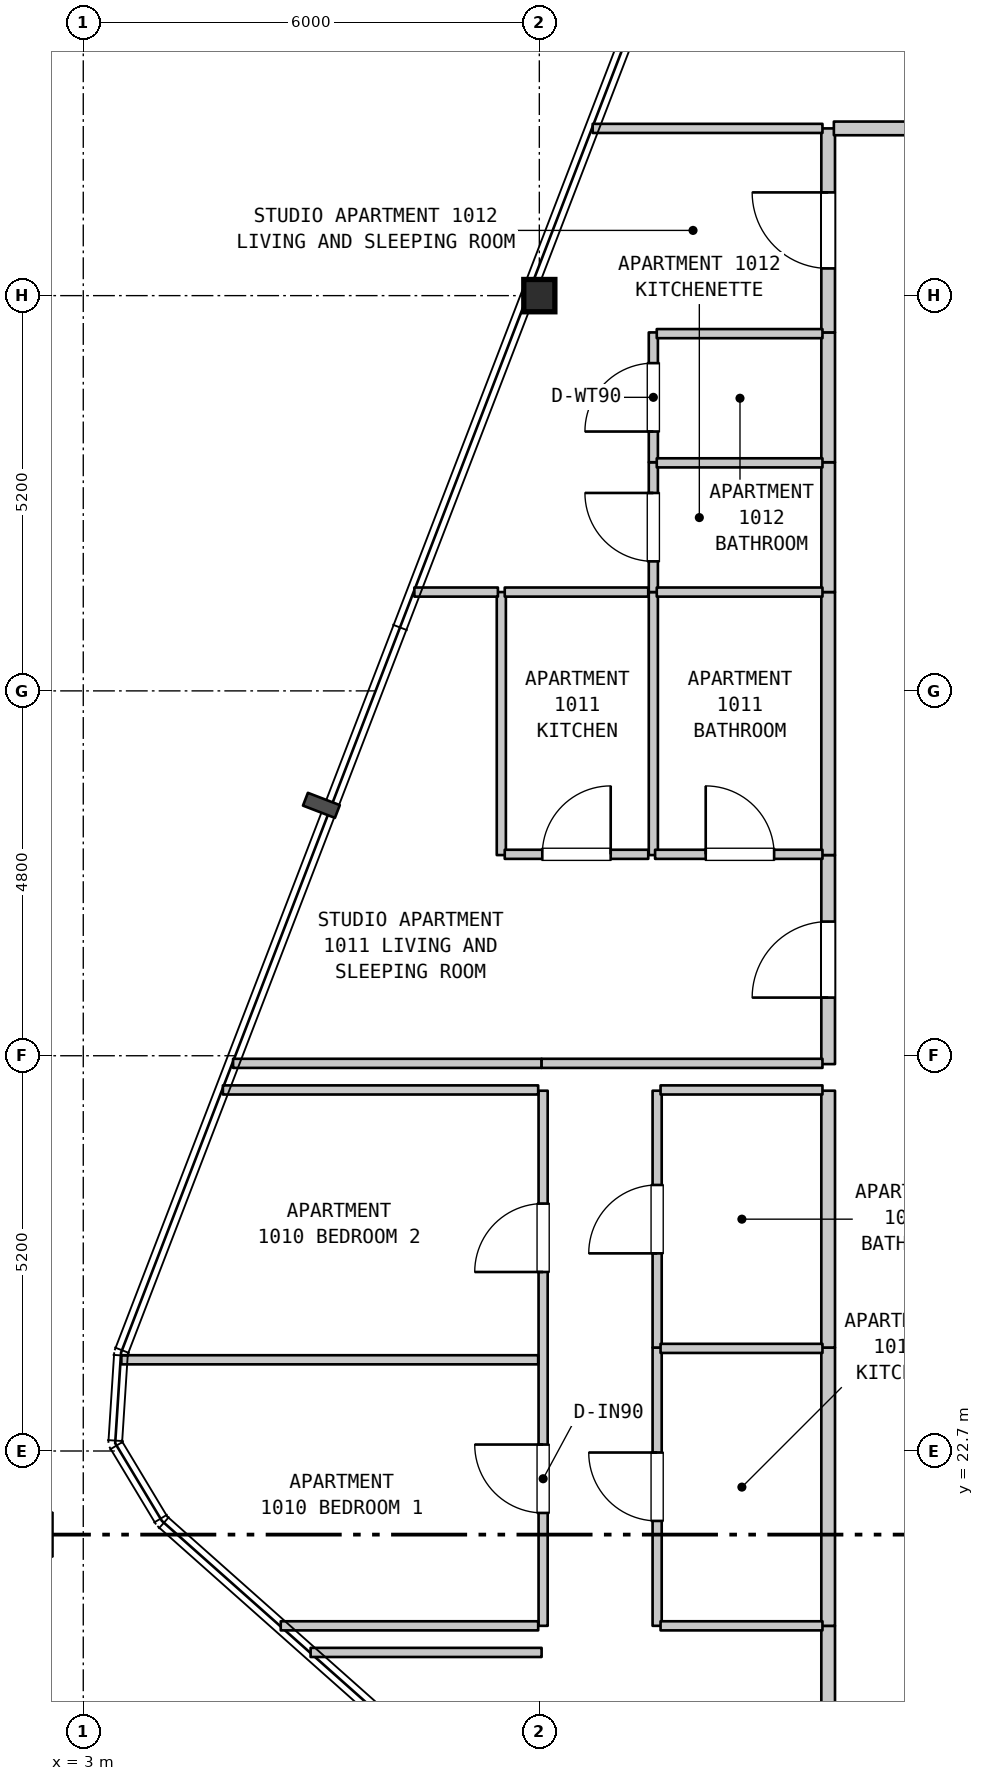
"""IFC4 building model, lengths in metres.
Left out: names, types, materials, properties, quantities, classifications, styles, units other than length and angle.
Written with IfcOpenShell. Run it as: python <this file> out.ifc"""

import sys

from ifc_helpers import new_model, si_unit, direction, frame, frame_2d, origin, origin_2d, place, context, subcontext, project, spatial, rectangle, i_section, extrude, element, fill, save


model = new_model("IFC4")
c1 = context("Model", 3, precision=1e-05, world=origin(), true_north=direction((0.0, 1.0)))
c2 = subcontext(c1, "Body", "Model", "MODEL_VIEW")
j1 = project(units=[si_unit("LENGTHUNIT", "METRE"), si_unit("PLANEANGLEUNIT", "RADIAN")], contexts=[c1])
p1 = place(None, origin())
s1 = spatial("IfcSite", under=j1, at=p1, CompositionType="ELEMENT")
p2 = place(p1, origin())
s2 = spatial("IfcBuilding", under=s1, at=p2, CompositionType="ELEMENT")
p3 = place(p2, frame((0.0, 0.0, 46.2)))
s3 = spatial("IfcBuildingStorey", under=s2, at=p3, CompositionType="ELEMENT", Elevation=46.2)
p4 = place(p3, frame((9.0, 37.9, 0.0), z_axis=(0.0, 0.0, 1.0), x_axis=(1.0, 0.0, 0.0)))
e1 = element("IfcColumn", 1, at=p4, inside=s3, PredefinedType="COLUMN", context=c2, shape_type="SweptSolid", body=[
    extrude(i_section(OverallWidth=0.409, OverallDepth=0.425, WebThickness=0.032, FlangeThickness=0.052, FilletRadius=0.015, at=origin_2d()), origin(), (0.0, 0.0, 1.0), 3.7),
])
p5 = place(p3, frame((8.5, 30.54, 0.0), z_axis=(0.0, 0.0, 1.0), x_axis=(0.0, 1.0, 0.0)))
e2 = element("IfcWall", 2, at=p5, inside=s3, PredefinedType="PARTITIONING", context=c2, shape_type="SweptSolid", body=[
    extrude(rectangle(XDim=3.46, YDim=0.12, at=frame_2d((1.73, 0.0))), origin(), (0.0, 0.0, 1.0), 3.385),
])
p6 = place(p3, frame((9.05, 20.4, 0.0), z_axis=(0.0, 0.0, 1.0), x_axis=(0.0, 1.0, 0.0)))
e3 = element("IfcWall", 3, at=p6, inside=s3, PredefinedType="PARTITIONING", context=c2, shape_type="SweptSolid", body=[
    extrude(rectangle(XDim=7.04, YDim=0.12, at=frame_2d((3.52, 0.0))), origin(), (0.0, 0.0, 1.0), 2.785),
])
p7 = place(p6, frame((1.485, 0.0, 0.0)))
e4 = element("IfcOpeningElement", 4, at=p7, cuts=e3, PredefinedType="OPENING", context=c2, shape_type="SweptSolid", body=[
    extrude(rectangle(XDim=0.9, YDim=2.15, at=frame_2d((0.45, 1.075))), frame((0.0, 0.07, 0.0), z_axis=(0.0, -1.0, 0.0), x_axis=(1.0, 0.0, 0.0)), (0.0, 0.0, 1.0), 0.14),
])
p8 = place(p6, frame((4.655, 0.0, 0.0)))
e5 = element("IfcOpeningElement", 5, at=p8, cuts=e3, PredefinedType="OPENING", context=c2, shape_type="SweptSolid", body=[
    extrude(rectangle(XDim=0.9, YDim=2.15, at=frame_2d((0.45, 1.075))), frame((0.0, 0.07, 0.0), z_axis=(0.0, -1.0, 0.0), x_axis=(1.0, 0.0, 0.0)), (0.0, 0.0, 1.0), 0.14),
])
p9 = place(p3, frame((10.5, 30.54, 0.0), z_axis=(0.0, 0.0, 1.0), x_axis=(0.0, 1.0, 0.0)))
e6 = element("IfcWall", 6, at=p9, inside=s3, PredefinedType="PARTITIONING", context=c2, shape_type="SweptSolid", body=[
    extrude(rectangle(XDim=3.46, YDim=0.12, at=frame_2d((1.73, 0.0))), origin(), (0.0, 0.0, 1.0), 3.385),
])
p10 = place(p3, frame((10.5, 34.0, 0.0), z_axis=(0.0, 0.0, 1.0), x_axis=(0.0, 1.0, 0.0)))
e7 = element("IfcWall", 7, at=p10, inside=s3, PredefinedType="PARTITIONING", context=c2, shape_type="SweptSolid", body=[
    extrude(rectangle(XDim=1.708, YDim=0.12, at=frame_2d((0.854, 0.0))), origin(), (0.0, 0.0, 1.0), 3.385),
])
p11 = place(p10, frame((0.404, 0.0, 0.0)))
e8 = element("IfcOpeningElement", 8, at=p11, cuts=e7, PredefinedType="OPENING", context=c2, shape_type="SweptSolid", body=[
    extrude(rectangle(XDim=0.9, YDim=2.15, at=frame_2d((0.45, 1.075))), frame((0.0, 0.07, 0.0), z_axis=(0.0, -1.0, 0.0), x_axis=(1.0, 0.0, 0.0)), (0.0, 0.0, 1.0), 0.14),
])
p12 = place(p3, frame((10.5, 35.708, 0.0), z_axis=(0.0, 0.0, 1.0), x_axis=(0.0, 1.0, 0.0)))
e9 = element("IfcWall", 9, at=p12, inside=s3, PredefinedType="PARTITIONING", context=c2, shape_type="SweptSolid", body=[
    extrude(rectangle(XDim=1.708, YDim=0.12, at=frame_2d((0.854, 0.0))), origin(), (0.0, 0.0, 1.0), 3.385),
])
p13 = place(p12, frame((0.404, 0.0, 0.0)))
e10 = element("IfcOpeningElement", 10, at=p13, cuts=e9, PredefinedType="OPENING", context=c2, shape_type="SweptSolid", body=[
    extrude(rectangle(XDim=0.9, YDim=2.1, at=frame_2d((0.45, 1.05))), frame((0.0, 0.07, 0.0), z_axis=(0.0, -1.0, 0.0), x_axis=(1.0, 0.0, 0.0)), (0.0, 0.0, 1.0), 0.14),
])
p14 = place(p3, frame((10.55, 20.4, 0.0), z_axis=(0.0, 0.0, 1.0), x_axis=(0.0, 1.0, 0.0)))
e11 = element("IfcWall", 11, at=p14, inside=s3, PredefinedType="PARTITIONING", context=c2, shape_type="SweptSolid", body=[
    extrude(rectangle(XDim=3.661, YDim=0.12, at=frame_2d((1.831, 0.0))), origin(), (0.0, 0.0, 1.0), 3.385),
])
p15 = place(p14, frame((1.38, 0.0, 0.0)))
e12 = element("IfcOpeningElement", 12, at=p15, cuts=e11, PredefinedType="OPENING", context=c2, shape_type="SweptSolid", body=[
    extrude(rectangle(XDim=0.9, YDim=2.15, at=frame_2d((0.45, 1.075))), frame((0.0, 0.07, 0.0), z_axis=(0.0, -1.0, 0.0), x_axis=(1.0, 0.0, 0.0)), (0.0, 0.0, 1.0), 0.14),
])
p16 = place(p3, frame((10.55, 24.061, 0.0), z_axis=(0.0, 0.0, 1.0), x_axis=(0.0, 1.0, 0.0)))
e13 = element("IfcWall", 13, at=p16, inside=s3, PredefinedType="PARTITIONING", context=c2, shape_type="SweptSolid", body=[
    extrude(rectangle(XDim=3.379, YDim=0.12, at=frame_2d((1.689, 0.0))), origin(), (0.0, 0.0, 1.0), 3.385),
])
p17 = place(p16, frame((1.239, 0.0, 0.0)))
e14 = element("IfcOpeningElement", 14, at=p17, cuts=e13, PredefinedType="OPENING", context=c2, shape_type="SweptSolid", body=[
    extrude(rectangle(XDim=0.9, YDim=2.1, at=frame_2d((0.45, 1.05))), frame((0.0, 0.07, 0.0), z_axis=(0.0, -1.0, 0.0), x_axis=(1.0, 0.0, 0.0)), (0.0, 0.0, 1.0), 0.14),
])
p18 = place(p3, frame((12.8, 17.3, 0.0), z_axis=(0.0, 0.0, 1.0), x_axis=(0.0, 1.0, 0.0)))
e15 = element("IfcWall", 15, at=p18, inside=s3, PredefinedType="STANDARD", context=c2, shape_type="SweptSolid", body=[
    extrude(rectangle(XDim=3.1, YDim=0.18, at=frame_2d((1.55, 0.0))), origin(), (0.0, 0.0, 1.0), 3.385),
])
p19 = place(p18, frame((0.978, 0.0, 0.0)))
e16 = element("IfcOpeningElement", 16, at=p19, cuts=e15, PredefinedType="OPENING", context=c2, shape_type="SweptSolid", body=[
    extrude(rectangle(XDim=1.0, YDim=2.15, at=frame_2d((0.5, 1.075))), frame((0.0, 0.1, 0.0), z_axis=(0.0, -1.0, 0.0), x_axis=(1.0, 0.0, 0.0)), (0.0, 0.0, 1.0), 0.2),
])
p20 = place(p3, frame((12.8, 20.4, 0.0), z_axis=(0.0, 0.0, 1.0), x_axis=(0.0, 1.0, 0.0)))
e17 = element("IfcWall", 17, at=p20, inside=s3, PredefinedType="STANDARD", context=c2, shape_type="SweptSolid", body=[
    extrude(rectangle(XDim=3.661, YDim=0.18, at=frame_2d((1.831, 0.0))), origin(), (0.0, 0.0, 1.0), 3.385),
])
p21 = place(p3, frame((12.8, 24.061, 0.0), z_axis=(0.0, 0.0, 1.0), x_axis=(0.0, 1.0, 0.0)))
e18 = element("IfcWall", 18, at=p21, inside=s3, PredefinedType="STANDARD", context=c2, shape_type="SweptSolid", body=[
    extrude(rectangle(XDim=3.379, YDim=0.18, at=frame_2d((1.689, 0.0))), origin(), (0.0, 0.0, 1.0), 3.385),
])
p22 = place(p3, frame((12.8, 27.79, 0.0), z_axis=(0.0, 0.0, 1.0), x_axis=(0.0, 1.0, 0.0)))
e19 = element("IfcWall", 19, at=p22, inside=s3, PredefinedType="STANDARD", context=c2, shape_type="SweptSolid", body=[
    extrude(rectangle(XDim=2.75, YDim=0.18, at=frame_2d((1.375, 0.0))), origin(), (0.0, 0.0, 1.0), 3.385),
])
p23 = place(p22, frame((0.875, 0.0, 0.0)))
e20 = element("IfcOpeningElement", 20, at=p23, cuts=e19, PredefinedType="OPENING", context=c2, shape_type="SweptSolid", body=[
    extrude(rectangle(XDim=1.0, YDim=2.15, at=frame_2d((0.5, 1.075))), frame((0.0, 0.1, 0.0), z_axis=(0.0, -1.0, 0.0), x_axis=(1.0, 0.0, 0.0)), (0.0, 0.0, 1.0), 0.2),
])
p24 = place(p3, frame((12.8, 30.54, 0.0), z_axis=(0.0, 0.0, 1.0), x_axis=(0.0, 1.0, 0.0)))
e21 = element("IfcWall", 21, at=p24, inside=s3, PredefinedType="STANDARD", context=c2, shape_type="SweptSolid", body=[
    extrude(rectangle(XDim=3.46, YDim=0.18, at=frame_2d((1.73, 0.0))), origin(), (0.0, 0.0, 1.0), 3.385),
])
for number, where, z_axis, x_axis in (
    (22, (12.8, 34.0, 0.0), (0.0, 0.0, 1.0), (0.0, 1.0, 0.0)),
    (23, (12.8, 35.708, 0.0), (0.0, 0.0, 1.0), (0.0, 1.0, 0.0)),
):
    element("IfcWall", number, at=place(p3, frame(where, z_axis=z_axis, x_axis=x_axis)), inside=s3, PredefinedType="STANDARD", context=c2, shape_type="SweptSolid", body=[
        extrude(rectangle(XDim=1.708, YDim=0.18, at=frame_2d((0.854, 0.0))), origin(), (0.0, 0.0, 1.0), 3.385),
    ])
p25 = place(p3, frame((12.8, 37.416, 0.0), z_axis=(0.0, 0.0, 1.0), x_axis=(0.0, 1.0, 0.0)))
e24 = element("IfcWall", 24, at=p25, inside=s3, PredefinedType="STANDARD", context=c2, shape_type="SweptSolid", body=[
    extrude(rectangle(XDim=2.684, YDim=0.18, at=frame_2d((1.342, 0.0))), origin(), (0.0, 0.0, 1.0), 3.385),
])
p26 = place(p25, frame((0.842, 0.0, 0.0)))
e25 = element("IfcOpeningElement", 25, at=p26, cuts=e24, PredefinedType="OPENING", context=c2, shape_type="SweptSolid", body=[
    extrude(rectangle(XDim=1.0, YDim=2.15, at=frame_2d((0.5, 1.075))), frame((0.0, 0.1, 0.0), z_axis=(0.0, -1.0, 0.0), x_axis=(1.0, 0.0, 0.0)), (0.0, 0.0, 1.0), 0.2),
])
p27 = place(p3, frame((5.991, 20.05, 0.0), z_axis=(0.0, 0.0, 1.0), x_axis=(1.0, 0.0, 0.0)))
e26 = element("IfcWall", 26, at=p27, inside=s3, PredefinedType="PARTITIONING", context=c2, shape_type="SweptSolid", body=[
    extrude(rectangle(XDim=3.039, YDim=0.12, at=frame_2d((1.52, 0.0))), origin(), (0.0, 0.0, 1.0), 3.385),
])
p28 = place(p3, frame((5.598, 20.4, 0.0), z_axis=(0.0, 0.0, 1.0), x_axis=(1.0, 0.0, 0.0)))
e27 = element("IfcWall", 27, at=p28, inside=s3, PredefinedType="PARTITIONING", context=c2, shape_type="SweptSolid", body=[
    extrude(rectangle(XDim=3.387, YDim=0.12, at=frame_2d((1.694, 0.0))), origin(), (0.0, 0.0, 1.0), 3.385),
])
p29 = place(p3, frame((10.595, 20.4, 0.0), z_axis=(0.0, 0.0, 1.0), x_axis=(1.0, 0.0, 0.0)))
e28 = element("IfcWall", 28, at=p29, inside=s3, PredefinedType="PARTITIONING", context=c2, shape_type="SweptSolid", body=[
    extrude(rectangle(XDim=2.13, YDim=0.12, at=frame_2d((1.065, 0.0))), origin(), (0.0, 0.0, 1.0), 3.385),
])
p30 = place(p3, frame((3.501, 23.9, 0.0), z_axis=(0.0, 0.0, 1.0), x_axis=(1.0, 0.0, 0.0)))
e29 = element("IfcWall", 29, at=p30, inside=s3, PredefinedType="PARTITIONING", context=c2, shape_type="SweptSolid", body=[
    extrude(rectangle(XDim=5.484, YDim=0.12, at=frame_2d((2.742, 0.0))), origin(), (0.0, 0.0, 1.0), 3.385),
])
p31 = place(p3, frame((10.595, 24.05, 0.0), z_axis=(0.0, 0.0, 1.0), x_axis=(1.0, 0.0, 0.0)))
e30 = element("IfcWall", 30, at=p31, inside=s3, PredefinedType="PARTITIONING", context=c2, shape_type="SweptSolid", body=[
    extrude(rectangle(XDim=2.13, YDim=0.12, at=frame_2d((1.065, 0.0))), origin(), (0.0, 0.0, 1.0), 3.385),
])
p32 = place(p3, frame((4.837, 27.45, 0.0), z_axis=(0.0, 0.0, 1.0), x_axis=(1.0, 0.0, 0.0)))
e31 = element("IfcWall", 31, at=p32, inside=s3, PredefinedType="PARTITIONING", context=c2, shape_type="SweptSolid", body=[
    extrude(rectangle(XDim=4.148, YDim=0.12, at=frame_2d((2.074, 0.0))), origin(), (0.0, 0.0, 1.0), 3.385),
])
p33 = place(p3, frame((10.595, 27.45, 0.0), z_axis=(0.0, 0.0, 1.0), x_axis=(1.0, 0.0, 0.0)))
e32 = element("IfcWall", 32, at=p33, inside=s3, PredefinedType="PARTITIONING", context=c2, shape_type="SweptSolid", body=[
    extrude(rectangle(XDim=2.13, YDim=0.12, at=frame_2d((1.065, 0.0))), origin(), (0.0, 0.0, 1.0), 3.385),
])
p34 = place(p3, frame((4.971, 27.8, 0.0), z_axis=(0.0, 0.0, 1.0), x_axis=(1.0, 0.0, 0.0)))
e33 = element("IfcWall", 33, at=p34, inside=s3, PredefinedType="PARTITIONING", context=c2, shape_type="SweptSolid", body=[
    extrude(rectangle(XDim=4.059, YDim=0.12, at=frame_2d((2.03, 0.0))), origin(), (0.0, 0.0, 1.0), 3.385),
])
p35 = place(p3, frame((9.03, 27.8, 0.0), z_axis=(0.0, 0.0, 1.0), x_axis=(1.0, 0.0, 0.0)))
e34 = element("IfcWall", 34, at=p35, inside=s3, PredefinedType="PARTITIONING", context=c2, shape_type="SweptSolid", body=[
    extrude(rectangle(XDim=3.695, YDim=0.12, at=frame_2d((1.848, 0.0))), origin(), (0.0, 0.0, 1.0), 3.385),
])
p36 = place(p3, frame((8.545, 30.55, 0.0), z_axis=(0.0, 0.0, 1.0), x_axis=(1.0, 0.0, 0.0)))
e35 = element("IfcWall", 35, at=p36, inside=s3, PredefinedType="PARTITIONING", context=c2, shape_type="SweptSolid", body=[
    extrude(rectangle(XDim=1.888, YDim=0.12, at=frame_2d((0.944, 0.0))), origin(), (0.0, 0.0, 1.0), 3.385),
])
p37 = place(p36, frame((0.494, 0.0, 0.0)))
e36 = element("IfcOpeningElement", 36, at=p37, cuts=e35, PredefinedType="OPENING", context=c2, shape_type="SweptSolid", body=[
    extrude(rectangle(XDim=0.9, YDim=2.15, at=frame_2d((0.45, 1.075))), frame((0.0, 0.07, 0.0), z_axis=(0.0, -1.0, 0.0), x_axis=(1.0, 0.0, 0.0)), (0.0, 0.0, 1.0), 0.14),
])
p38 = place(p3, frame((10.523, 30.55, 0.0), z_axis=(0.0, 0.0, 1.0), x_axis=(1.0, 0.0, 0.0)))
e37 = element("IfcWall", 37, at=p38, inside=s3, PredefinedType="PARTITIONING", context=c2, shape_type="SweptSolid", body=[
    extrude(rectangle(XDim=2.202, YDim=0.12, at=frame_2d((1.101, 0.0))), origin(), (0.0, 0.0, 1.0), 3.385),
])
p39 = place(p38, frame((0.666, 0.0, 0.0)))
e38 = element("IfcOpeningElement", 38, at=p39, cuts=e37, PredefinedType="OPENING", context=c2, shape_type="SweptSolid", body=[
    extrude(rectangle(XDim=0.9, YDim=2.1, at=frame_2d((0.45, 1.05))), frame((0.0, 0.07, 0.0), z_axis=(0.0, -1.0, 0.0), x_axis=(1.0, 0.0, 0.0)), (0.0, 0.0, 1.0), 0.14),
])
p40 = place(p3, frame((7.356, 34.0, 0.0), z_axis=(0.0, 0.0, 1.0), x_axis=(1.0, 0.0, 0.0)))
e39 = element("IfcWall", 39, at=p40, inside=s3, PredefinedType="PARTITIONING", context=c2, shape_type="SweptSolid", body=[
    extrude(rectangle(XDim=1.099, YDim=0.12, at=frame_2d((0.55, 0.0))), origin(), (0.0, 0.0, 1.0), 3.385),
])
p41 = place(p3, frame((8.545, 34.0, 0.0), z_axis=(0.0, 0.0, 1.0), x_axis=(1.0, 0.0, 0.0)))
e40 = element("IfcWall", 40, at=p41, inside=s3, PredefinedType="PARTITIONING", context=c2, shape_type="SweptSolid", body=[
    extrude(rectangle(XDim=1.888, YDim=0.12, at=frame_2d((0.944, 0.0))), origin(), (0.0, 0.0, 1.0), 3.385),
])
for number, where, z_axis, x_axis in (
    (41, (10.545, 34.0, 0.0), (0.0, 0.0, 1.0), (1.0, 0.0, 0.0)),
    (42, (10.545, 35.7, 0.0), (0.0, 0.0, 1.0), (1.0, 0.0, 0.0)),
    (43, (10.545, 37.4, 0.0), (0.0, 0.0, 1.0), (1.0, 0.0, 0.0)),
):
    element("IfcWall", number, at=place(p3, frame(where, z_axis=z_axis, x_axis=x_axis)), inside=s3, PredefinedType="PARTITIONING", context=c2, shape_type="SweptSolid", body=[
        extrude(rectangle(XDim=2.18, YDim=0.12, at=frame_2d((1.09, 0.0))), origin(), (0.0, 0.0, 1.0), 3.385),
    ])
p42 = place(p3, frame((9.702, 40.1, 0.0), z_axis=(0.0, 0.0, 1.0), x_axis=(1.0, 0.0, 0.0)))
e44 = element("IfcWall", 44, at=p42, inside=s3, PredefinedType="PARTITIONING", context=c2, shape_type="SweptSolid", body=[
    extrude(rectangle(XDim=3.023, YDim=0.12, at=frame_2d((1.512, 0.0))), origin(), (0.0, 0.0, 1.0), 3.385),
])
p43 = place(p3, frame((12.875, 40.1, 0.0), z_axis=(0.0, 0.0, 1.0), x_axis=(1.0, 0.0, 0.0)))
e45 = element("IfcWall", 45, at=p43, inside=s3, PredefinedType="STANDARD", context=c2, shape_type="SweptSolid", body=[
    extrude(rectangle(XDim=1.48, YDim=0.18, at=frame_2d((0.74, 0.0))), origin(), (0.0, 0.0, 1.0), 3.385),
])
p44 = place(p7, origin())
e46 = element("IfcDoor", 46, at=p44, inside=s3, OperationType="SINGLE_SWING_RIGHT", PredefinedType="DOOR", context=c2, shape_type="SweptSolid", body=[
    extrude(rectangle(XDim=0.9, YDim=2.15, at=frame_2d((0.45, 1.075))), frame((0.0, 0.025, 0.0), z_axis=(0.0, -1.0, 0.0), x_axis=(1.0, 0.0, 0.0)), (0.0, 0.0, 1.0), 0.05),
])
fill(e4, e46)
p45 = place(p8, origin())
e47 = element("IfcDoor", 47, at=p45, inside=s3, OperationType="SINGLE_SWING_LEFT", PredefinedType="DOOR", context=c2, shape_type="SweptSolid", body=[
    extrude(rectangle(XDim=0.9, YDim=2.15, at=frame_2d((0.45, 1.075))), frame((0.0, 0.025, 0.0), z_axis=(0.0, -1.0, 0.0), x_axis=(1.0, 0.0, 0.0)), (0.0, 0.0, 1.0), 0.05),
])
fill(e5, e47)
p46 = place(p11, origin())
e48 = element("IfcDoor", 48, at=p46, inside=s3, OperationType="SINGLE_SWING_RIGHT", PredefinedType="DOOR", context=c2, shape_type="SweptSolid", body=[
    extrude(rectangle(XDim=0.9, YDim=2.15, at=frame_2d((0.45, 1.075))), frame((0.0, 0.025, 0.0), z_axis=(0.0, -1.0, 0.0), x_axis=(1.0, 0.0, 0.0)), (0.0, 0.0, 1.0), 0.05),
])
fill(e8, e48)
p47 = place(p13, origin())
e49 = element("IfcDoor", 49, at=p47, inside=s3, OperationType="SINGLE_SWING_LEFT", PredefinedType="DOOR", context=c2, shape_type="SweptSolid", body=[
    extrude(rectangle(XDim=0.9, YDim=2.1, at=frame_2d((0.45, 1.05))), frame((0.0, 0.025, 0.0), z_axis=(0.0, -1.0, 0.0), x_axis=(1.0, 0.0, 0.0)), (0.0, 0.0, 1.0), 0.05),
])
fill(e10, e49)
p48 = place(p15, origin())
e50 = element("IfcDoor", 50, at=p48, inside=s3, OperationType="SINGLE_SWING_RIGHT", PredefinedType="DOOR", context=c2, shape_type="SweptSolid", body=[
    extrude(rectangle(XDim=0.9, YDim=2.15, at=frame_2d((0.45, 1.075))), frame((0.0, 0.025, 0.0), z_axis=(0.0, -1.0, 0.0), x_axis=(1.0, 0.0, 0.0)), (0.0, 0.0, 1.0), 0.05),
])
fill(e12, e50)
p49 = place(p17, origin())
e51 = element("IfcDoor", 51, at=p49, inside=s3, OperationType="SINGLE_SWING_LEFT", PredefinedType="DOOR", context=c2, shape_type="SweptSolid", body=[
    extrude(rectangle(XDim=0.9, YDim=2.1, at=frame_2d((0.45, 1.05))), frame((0.0, 0.025, 0.0), z_axis=(0.0, -1.0, 0.0), x_axis=(1.0, 0.0, 0.0)), (0.0, 0.0, 1.0), 0.05),
])
fill(e14, e51)
p50 = place(p23, origin())
e52 = element("IfcDoor", 52, at=p50, inside=s3, OperationType="SINGLE_SWING_LEFT", PredefinedType="DOOR", context=c2, shape_type="SweptSolid", body=[
    extrude(rectangle(XDim=1.0, YDim=2.15, at=frame_2d((0.5, 1.075))), frame((0.0, 0.025, 0.0), z_axis=(0.0, -1.0, 0.0), x_axis=(1.0, 0.0, 0.0)), (0.0, 0.0, 1.0), 0.05),
])
fill(e20, e52)
p51 = place(p26, origin())
e53 = element("IfcDoor", 53, at=p51, inside=s3, OperationType="SINGLE_SWING_RIGHT", PredefinedType="DOOR", context=c2, shape_type="SweptSolid", body=[
    extrude(rectangle(XDim=1.0, YDim=2.15, at=frame_2d((0.5, 1.075))), frame((0.0, 0.025, 0.0), z_axis=(0.0, -1.0, 0.0), x_axis=(1.0, 0.0, 0.0)), (0.0, 0.0, 1.0), 0.05),
])
fill(e25, e53)
p52 = place(p37, origin())
e54 = element("IfcDoor", 54, at=p52, inside=s3, OperationType="SINGLE_SWING_RIGHT", PredefinedType="DOOR", context=c2, shape_type="SweptSolid", body=[
    extrude(rectangle(XDim=0.9, YDim=2.15, at=frame_2d((0.45, 1.075))), frame((0.0, 0.025, 0.0), z_axis=(0.0, -1.0, 0.0), x_axis=(1.0, 0.0, 0.0)), (0.0, 0.0, 1.0), 0.05),
])
fill(e36, e54)
p53 = place(p39, origin())
e55 = element("IfcDoor", 55, at=p53, inside=s3, OperationType="SINGLE_SWING_LEFT", PredefinedType="DOOR", context=c2, shape_type="SweptSolid", body=[
    extrude(rectangle(XDim=0.9, YDim=2.1, at=frame_2d((0.45, 1.05))), frame((0.0, 0.025, 0.0), z_axis=(0.0, -1.0, 0.0), x_axis=(1.0, 0.0, 0.0)), (0.0, 0.0, 1.0), 0.05),
])
fill(e38, e55)
save(model, sys.argv[1])
